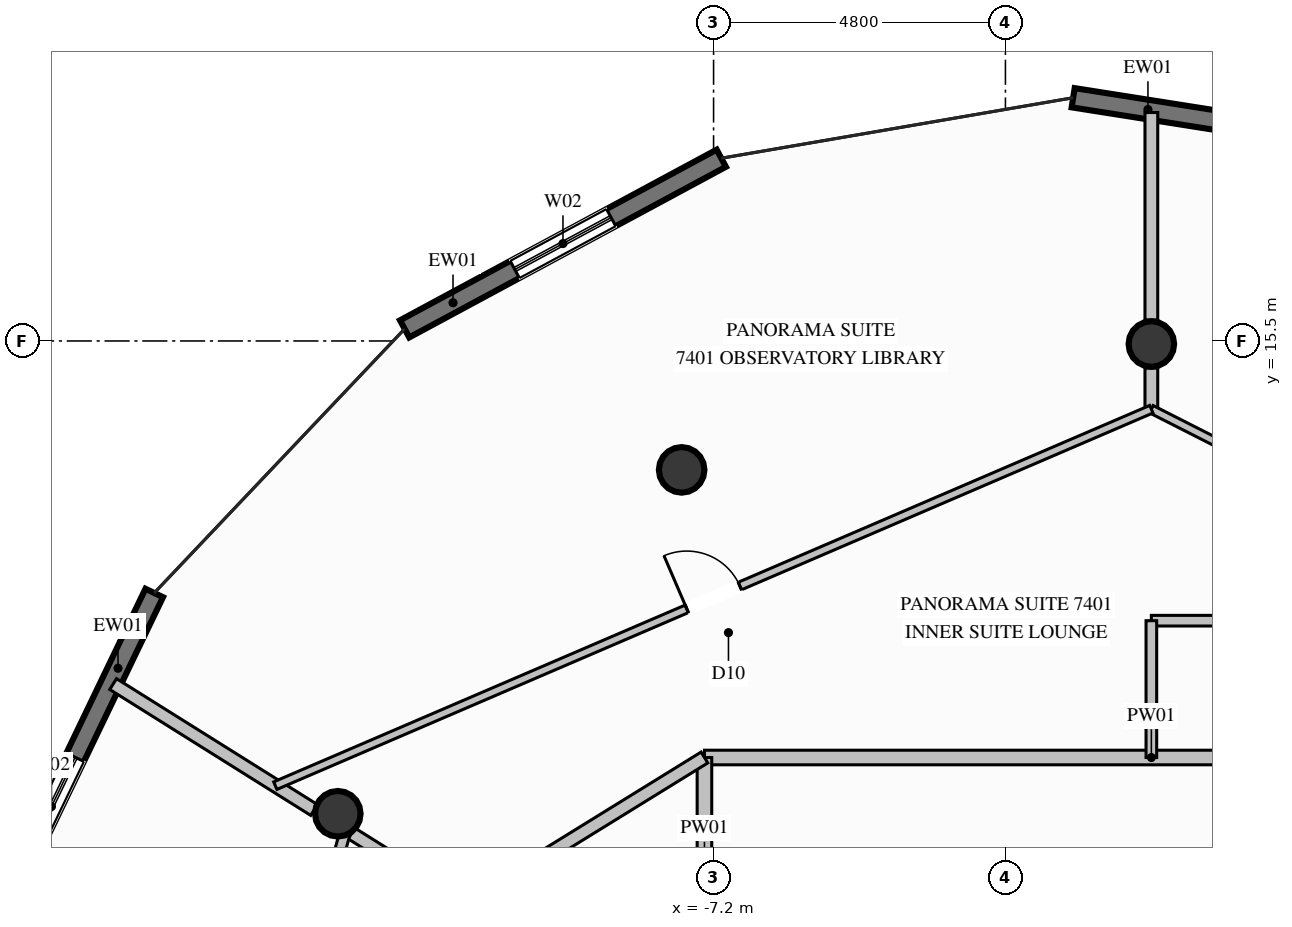
"""IFC4 building model, lengths in metres.
Left out: names, types, materials, properties, quantities, classifications, styles, units other than length and angle.
Written with IfcOpenShell. Run it as: python <this file> out.ifc"""

import sys

from ifc_helpers import new_model, si_unit, direction, frame, frame_2d, origin, origin_2d, place, context, subcontext, project, spatial, rectangle, circle, extrude, element, fill, save


model = new_model("IFC4")
c1 = context("Model", 3, precision=1e-05, world=origin(), true_north=direction((0.0, 1.0)))
c2 = subcontext(c1, "Body", "Model", "MODEL_VIEW")
j1 = project(units=[si_unit("LENGTHUNIT", "METRE"), si_unit("PLANEANGLEUNIT", "RADIAN")], contexts=[c1])
p1 = place(None, origin())
s1 = spatial("IfcSite", under=j1, at=p1, CompositionType="ELEMENT")
p2 = place(p1, origin())
s2 = spatial("IfcBuilding", under=s1, at=p2, CompositionType="ELEMENT")
p3 = place(p2, frame((0.0, 0.0, 278.2)))
s3 = spatial("IfcBuildingStorey", under=s2, at=p3, CompositionType="ELEMENT", Elevation=278.2)
for number, where, z_axis, x_axis in (
    (1, (0.0, 15.45, 0.0), (0.0, 0.0, 1.0), (1.0, 0.0, 0.0)),
    (2, (-7.725, 13.38, 0.0), (0.0, 0.0, 1.0), (1.0, 0.0, 0.0)),
    (3, (-13.38, 7.725, 0.0), (0.0, 0.0, 1.0), (1.0, 0.0, 0.0)),
):
    element("IfcColumn", number, at=place(p3, frame(where, z_axis=z_axis, x_axis=x_axis)), inside=s3, PredefinedType="COLUMN", context=c2, shape_type="SweptSolid", body=[
        extrude(circle(Radius=0.375, at=origin_2d()), origin(), (0.0, 0.0, 1.0), 3.8),
    ])
p4 = place(p3, frame((-1.286, 19.5, 0.0), z_axis=(0.0, 0.0, 1.0), x_axis=(0.987807428438, -0.155680712749, 0.0)))
e4 = element("IfcWall", 4, at=p4, inside=s3, PredefinedType="SOLIDWALL", context=c2, shape_type="SweptSolid", body=[
    extrude(rectangle(XDim=5.871, YDim=0.32, at=frame_2d((2.936, 0.0))), origin(), (0.0, 0.0, 1.0), 3.57),
])
p5 = place(p4, frame((2.74, 0.0, 0.35)))
e5 = element("IfcOpeningElement", 5, at=p5, cuts=e4, PredefinedType="OPENING", context=c2, shape_type="SweptSolid", body=[
    extrude(rectangle(XDim=1.8, YDim=2.6, at=frame_2d((0.9, 1.3))), frame((0.0, 0.17, 0.0), z_axis=(0.0, -1.0, 0.0), x_axis=(1.0, 0.0, 0.0)), (0.0, 0.0, 1.0), 0.34),
])
p6 = place(p3, frame((-12.281, 15.699, 0.0), z_axis=(0.0, 0.0, 1.0), x_axis=(0.880358436165, 0.474308996196, 0.0)))
e6 = element("IfcWall", 6, at=p6, inside=s3, PredefinedType="SOLIDWALL", context=c2, shape_type="SweptSolid", body=[
    extrude(rectangle(XDim=5.916, YDim=0.32, at=frame_2d((2.958, 0.0))), origin(), (0.0, 0.0, 1.0), 3.57),
])
p7 = place(p6, frame((2.058, 0.0, 0.35)))
e7 = element("IfcOpeningElement", 7, at=p7, cuts=e6, PredefinedType="OPENING", context=c2, shape_type="SweptSolid", body=[
    extrude(rectangle(XDim=1.8, YDim=2.6, at=frame_2d((0.9, 1.3))), frame((0.0, 0.17, 0.0), z_axis=(0.0, -1.0, 0.0), x_axis=(1.0, 0.0, 0.0)), (0.0, 0.0, 1.0), 0.34),
])
p8 = place(p3, frame((-19.024, 5.901, 0.0), z_axis=(0.0, 0.0, 1.0), x_axis=(0.433611899422, 0.901099728487, 0.0)))
e8 = element("IfcWall", 8, at=p8, inside=s3, PredefinedType="SOLIDWALL", context=c2, shape_type="SweptSolid", body=[
    extrude(rectangle(XDim=6.054, YDim=0.32, at=frame_2d((3.027, 0.0))), origin(), (0.0, 0.0, 1.0), 3.57),
])
p9 = place(p8, frame((1.255, 0.0, 0.35)))
e9 = element("IfcOpeningElement", 9, at=p9, cuts=e8, PredefinedType="OPENING", context=c2, shape_type="SweptSolid", body=[
    extrude(rectangle(XDim=1.8, YDim=2.6, at=frame_2d((0.9, 1.3))), frame((0.0, 0.17, 0.0), z_axis=(0.0, -1.0, 0.0), x_axis=(1.0, 0.0, 0.0)), (0.0, 0.0, 1.0), 0.34),
])
p10 = place(p3, frame((-7.35, 8.65, 0.0), z_axis=(0.0, 0.0, 1.0), x_axis=(1.0, 0.0, 0.0)))
e10 = element("IfcWall", 10, at=p10, inside=s3, PredefinedType="PARTITIONING", context=c2, shape_type="SweptSolid", body=[
    extrude(rectangle(XDim=14.7, YDim=0.24, at=frame_2d((7.35, 0.0))), origin(), (0.0, 0.0, 1.0), 3.57),
])
p11 = place(p3, frame((-7.35, 4.95, 0.0), z_axis=(0.0, 0.0, 1.0), x_axis=(0.0, 1.0, 0.0)))
e11 = element("IfcWall", 11, at=p11, inside=s3, PredefinedType="PARTITIONING", context=c2, shape_type="SweptSolid", body=[
    extrude(rectangle(XDim=3.7, YDim=0.24, at=frame_2d((1.85, 0.0))), origin(), (0.0, 0.0, 1.0), 2.655),
])
p12 = place(p3, frame((-11.278, 6.225, 0.0), z_axis=(0.0, 0.0, 1.0), x_axis=(-0.847328563413, 0.531069021525, 0.0)))
e12 = element("IfcWall", 12, at=p12, inside=s3, PredefinedType="PARTITIONING", context=c2, shape_type="SweptSolid", body=[
    extrude(rectangle(XDim=2.214, YDim=0.21, at=frame_2d((1.107, 0.0))), origin(), (0.0, 0.0, 1.0), 3.011),
])
p13 = place(p3, frame((-13.77, 7.787, 0.0), z_axis=(0.0, 0.0, 1.0), x_axis=(-0.847396390163, 0.530960787572, 0.0)))
e13 = element("IfcWall", 13, at=p13, inside=s3, PredefinedType="PARTITIONING", context=c2, shape_type="SweptSolid", body=[
    extrude(rectangle(XDim=3.9, YDim=0.21, at=frame_2d((1.95, 0.0))), origin(), (0.0, 0.0, 1.0), 3.57),
])
for number, where, z_axis, x_axis in (
    (14, (0.0, 10.9, 0.0), (0.0, 0.0, 1.0), (1.0, 0.0, 0.0)),
    (15, (0.0, 10.9, 0.0), (0.0, 0.0, 1.0), (0.0, -1.0, 0.0)),
):
    element("IfcWall", number, at=place(p3, frame(where, z_axis=z_axis, x_axis=x_axis)), inside=s3, PredefinedType="PLUMBINGWALL", context=c2, shape_type="SweptSolid", body=[
        extrude(rectangle(XDim=2.25, YDim=0.175, at=frame_2d((1.125, 0.0))), origin(), (0.0, 0.0, 1.0), 3.57),
    ])
p14 = place(p3, frame((-11.278, 6.225, 0.0), z_axis=(0.0, 0.0, 1.0), x_axis=(0.85092385233, 0.525289060933, 0.0)))
e16 = element("IfcWall", 16, at=p14, inside=s3, PredefinedType="PARTITIONING", context=c2, shape_type="SweptSolid", body=[
    extrude(rectangle(XDim=4.616, YDim=0.21, at=frame_2d((2.308, 0.0))), origin(), (0.0, 0.0, 1.0), 3.57),
])
p15 = place(p3, frame((0.0, 14.378, 0.0), z_axis=(0.0, 0.0, 1.0), x_axis=(0.0, 1.0, 0.0)))
e17 = element("IfcWall", 17, at=p15, inside=s3, PredefinedType="PARTITIONING", context=c2, shape_type="SweptSolid", body=[
    extrude(rectangle(XDim=0.677, YDim=0.21, at=frame_2d((0.338, 0.0))), origin(), (0.0, 0.0, 1.0), 3.57),
])
p16 = place(p3, frame((0.0, 15.845, 0.0), z_axis=(0.0, 0.0, 1.0), x_axis=(0.0, 1.0, 0.0)))
e18 = element("IfcWall", 18, at=p16, inside=s3, PredefinedType="PARTITIONING", context=c2, shape_type="SweptSolid", body=[
    extrude(rectangle(XDim=3.412, YDim=0.21, at=frame_2d((1.706, 0.0))), origin(), (0.0, 0.0, 1.0), 3.57),
])
p17 = place(p3, frame((0.0, 14.378, 0.0), z_axis=(0.0, 0.0, 1.0), x_axis=(0.891513801847, -0.452993533195, 0.0)))
e19 = element("IfcWall", 19, at=p17, inside=s3, PredefinedType="PARTITIONING", context=c2, shape_type="SweptSolid", body=[
    extrude(rectangle(XDim=14.912, YDim=0.135, at=frame_2d((7.456, 0.0))), origin(), (0.0, 0.0, 1.0), 3.011),
])
p18 = place(p17, frame((6.981, 0.0, 0.0)))
e20 = element("IfcOpeningElement", 20, at=p18, cuts=e19, PredefinedType="OPENING", context=c2, shape_type="SweptSolid", body=[
    extrude(rectangle(XDim=0.95, YDim=2.1, at=frame_2d((0.475, 1.05))), frame((0.0, 0.078, 0.0), z_axis=(0.0, -1.0, 0.0), x_axis=(1.0, 0.0, 0.0)), (0.0, 0.0, 1.0), 0.155),
])
p19 = place(p3, frame((-14.408, 8.187, 0.0), z_axis=(0.0, 0.0, 1.0), x_axis=(0.918773394329, 0.394785321247, 0.0)))
e21 = element("IfcWall", 21, at=p19, inside=s3, PredefinedType="PARTITIONING", context=c2, shape_type="SweptSolid", body=[
    extrude(rectangle(XDim=15.682, YDim=0.135, at=frame_2d((7.841, 0.0))), origin(), (0.0, 0.0, 1.0), 3.57),
])
p20 = place(p19, frame((7.366, 0.0, 0.0)))
e22 = element("IfcOpeningElement", 22, at=p20, cuts=e21, PredefinedType="OPENING", context=c2, shape_type="SweptSolid", body=[
    extrude(rectangle(XDim=0.95, YDim=2.1, at=frame_2d((0.475, 1.05))), frame((0.0, 0.078, 0.0), z_axis=(0.0, -1.0, 0.0), x_axis=(1.0, 0.0, 0.0)), (0.0, 0.0, 1.0), 0.155),
])
p21 = place(p3, frame((-13.249, 7.46, 0.0), z_axis=(0.0, 0.0, 1.0), x_axis=(-0.264854882297, -0.96428828227, 0.0)))
e23 = element("IfcWall", 23, at=p21, inside=s3, PredefinedType="PLUMBINGWALL", context=c2, shape_type="SweptSolid", body=[
    extrude(rectangle(XDim=3.293, YDim=0.175, at=frame_2d((1.646, 0.0))), origin(), (0.0, 0.0, 1.0), 3.137),
])
p22 = place(p7, origin())
e24 = element("IfcWindow", 24, at=p22, inside=s3, PartitioningType="SINGLE_PANEL", PredefinedType="WINDOW", context=c2, shape_type="SweptSolid", body=[
    extrude(rectangle(XDim=1.8, YDim=2.6, at=frame_2d((0.9, 1.3))), frame((0.0, 0.03, 0.0), z_axis=(0.0, -1.0, 0.0), x_axis=(1.0, 0.0, 0.0)), (0.0, 0.0, 1.0), 0.06),
])
fill(e7, e24)
p23 = place(p9, origin())
e25 = element("IfcWindow", 25, at=p23, inside=s3, PartitioningType="SINGLE_PANEL", PredefinedType="WINDOW", context=c2, shape_type="SweptSolid", body=[
    extrude(rectangle(XDim=1.8, YDim=2.6, at=frame_2d((0.9, 1.3))), frame((0.0, 0.03, 0.0), z_axis=(0.0, -1.0, 0.0), x_axis=(1.0, 0.0, 0.0)), (0.0, 0.0, 1.0), 0.06),
])
fill(e9, e25)
p24 = place(p20, origin())
e26 = element("IfcDoor", 26, at=p24, inside=s3, OperationType="SINGLE_SWING_LEFT", PredefinedType="DOOR", context=c2, shape_type="SweptSolid", body=[
    extrude(rectangle(XDim=0.95, YDim=2.1, at=frame_2d((0.475, 1.05))), frame((0.0, 0.025, 0.0), z_axis=(0.0, -1.0, 0.0), x_axis=(1.0, 0.0, 0.0)), (0.0, 0.0, 1.0), 0.05),
])
fill(e22, e26)
save(model, sys.argv[1])
